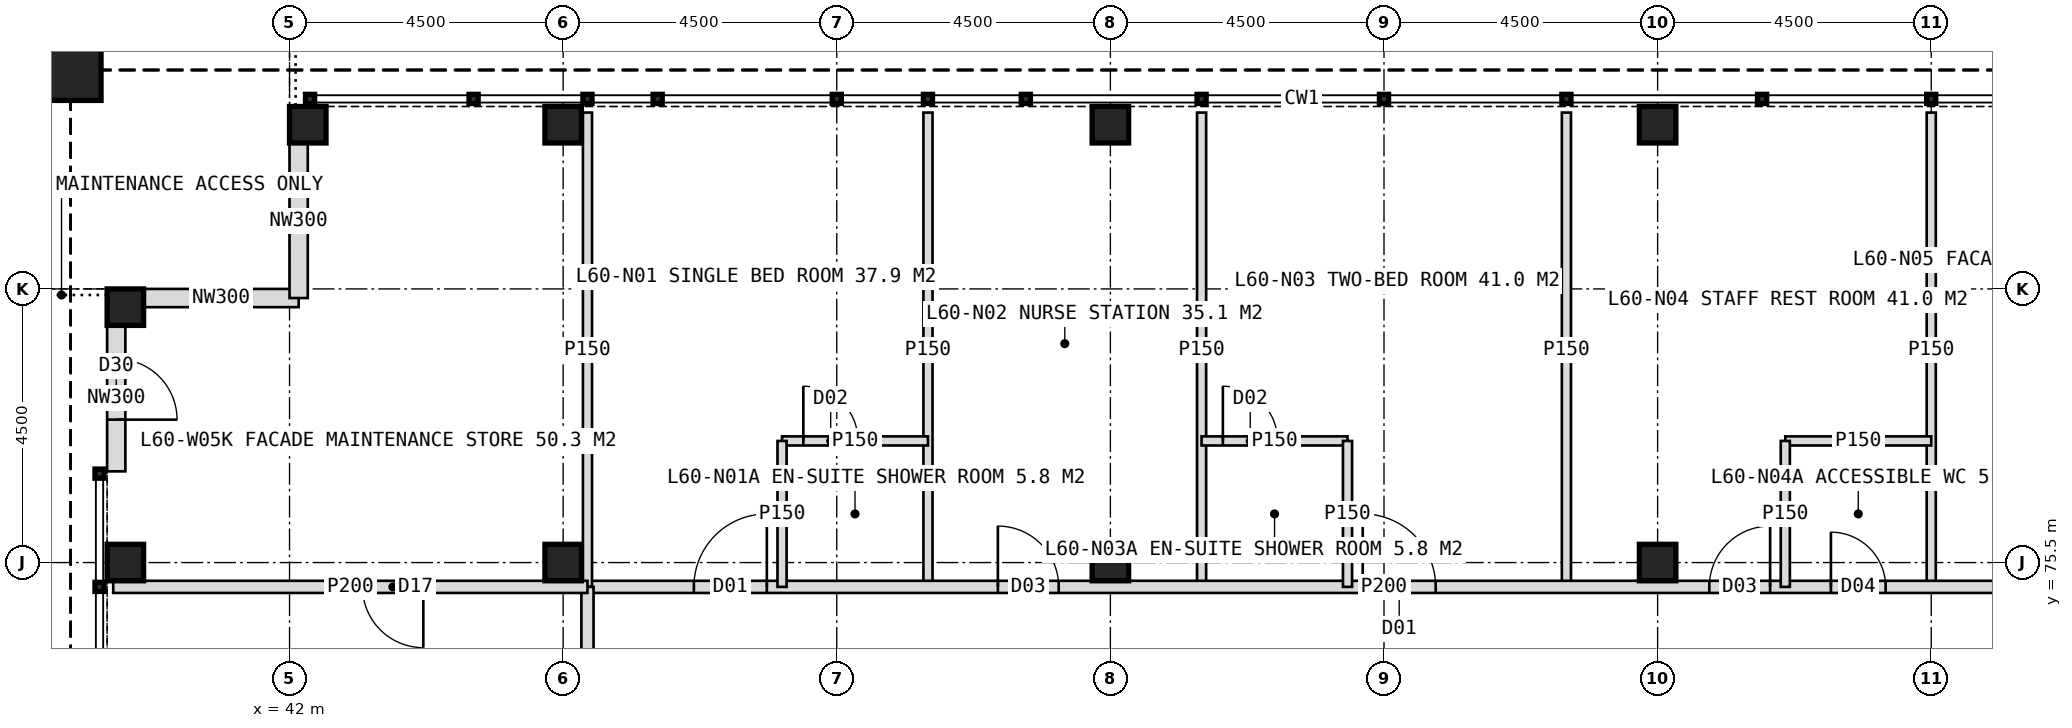
"""IFC4 building model, lengths in metres.
Left out: names, types, materials, properties, quantities, classifications, styles, units other than length and angle.
Written with IfcOpenShell. Run it as: python <this file> out.ifc"""

import sys

from ifc_helpers import new_model, si_unit, direction, frame, frame_2d, origin, origin_2d, place, context, subcontext, project, spatial, rectangle, hollow_rectangle, extrude, element, fill, save


model = new_model("IFC4")
c1 = context("Model", 3, precision=1e-05, world=origin(), true_north=direction((0.0, 1.0)))
c2 = subcontext(c1, "Body", "Model", "MODEL_VIEW")
j1 = project(units=[si_unit("LENGTHUNIT", "METRE"), si_unit("PLANEANGLEUNIT", "RADIAN")], contexts=[c1])
p1 = place(None, origin())
s1 = spatial("IfcSite", under=j1, at=p1, CompositionType="ELEMENT")
p2 = place(p1, origin())
s2 = spatial("IfcBuilding", under=s1, at=p2, CompositionType="ELEMENT")
p3 = place(p2, frame((0.0, 0.0, 250.0)))
s3 = spatial("IfcBuildingStorey", under=s2, at=p3, CompositionType="ELEMENT", Elevation=250.0)
for number, where, z_axis, x_axis in (
    (1, (46.5, 75.5, 0.0), (0.0, 0.0, 1.0), (1.0, 0.0, 0.0)),
    (2, (55.5, 75.5, 0.0), (0.0, 0.0, 1.0), (1.0, 0.0, 0.0)),
    (3, (64.5, 75.5, 0.0), (0.0, 0.0, 1.0), (1.0, 0.0, 0.0)),
    (4, (42.3, 82.7, 0.0), (0.0, 0.0, 1.0), (1.0, 0.0, 0.0)),
    (5, (46.5, 82.7, 0.0), (0.0, 0.0, 1.0), (1.0, 0.0, 0.0)),
    (6, (55.5, 82.7, 0.0), (0.0, 0.0, 1.0), (1.0, 0.0, 0.0)),
    (7, (64.5, 82.7, 0.0), (0.0, 0.0, 1.0), (1.0, 0.0, 0.0)),
    (8, (39.3, 75.5, 0.0), (0.0, 0.0, 1.0), (1.0, 0.0, 0.0)),
    (9, (39.3, 79.7, 0.0), (0.0, 0.0, 1.0), (1.0, 0.0, 0.0)),
):
    element("IfcColumn", number, at=place(p3, frame(where, z_axis=z_axis, x_axis=x_axis)), inside=s3, PredefinedType="COLUMN", context=c2, shape_type="SweptSolid", body=[
        extrude(hollow_rectangle(XDim=0.6, YDim=0.6, WallThickness=0.04, at=origin_2d()), origin(), (0.0, 0.0, 1.0), 4.0),
    ])
p4 = place(p3, frame((38.4, 83.6, 2.0), z_axis=(0.0, 0.0, 1.0), x_axis=(1.0, 0.0, 0.0)))
e10 = element("IfcColumn", 10, at=p4, inside=s3, PredefinedType="COLUMN", context=c2, shape_type="SweptSolid", body=[
    extrude(hollow_rectangle(XDim=1.0, YDim=1.0, WallThickness=0.06, at=origin_2d()), origin(), (0.0, 0.0, 1.0), 2.0),
])
p5 = place(p3, frame((39.15, 77.0, 0.0), z_axis=(0.0, 0.0, 1.0), x_axis=(0.0, 1.0, 0.0)))
e11 = element("IfcWall", 11, at=p5, inside=s3, PredefinedType="ELEMENTEDWALL", context=c2, shape_type="SweptSolid", body=[
    extrude(rectangle(XDim=2.4, YDim=0.3, at=frame_2d((1.2, 0.0))), origin(), (0.0, 0.0, 1.0), 3.226),
])
p6 = place(p5, frame((0.85, 0.0, 0.0)))
e12 = element("IfcOpeningElement", 12, at=p6, cuts=e11, PredefinedType="OPENING", context=c2, shape_type="SweptSolid", body=[
    extrude(rectangle(XDim=1.0, YDim=2.1, at=frame_2d((0.5, 1.05))), frame((0.0, 0.16, 0.0), z_axis=(0.0, -1.0, 0.0), x_axis=(1.0, 0.0, 0.0)), (0.0, 0.0, 1.0), 0.32),
])
for number, where, z_axis, x_axis in (
    (13, (39.6, 79.85, 0.0), (0.0, 0.0, 1.0), (1.0, 0.0, 0.0)),
    (14, (42.15, 79.85, 0.0), (0.0, 0.0, 1.0), (0.0, 1.0, 0.0)),
):
    element("IfcWall", number, at=place(p3, frame(where, z_axis=z_axis, x_axis=x_axis)), inside=s3, PredefinedType="ELEMENTEDWALL", context=c2, shape_type="SweptSolid", body=[
        extrude(rectangle(XDim=2.55, YDim=0.3, at=frame_2d((1.275, 0.0))), origin(), (0.0, 0.0, 1.0), 2.95),
    ])
for number, where, z_axis, x_axis in (
    (15, (52.5, 75.1, 0.0), (0.0, 0.0, 1.0), (0.0, 1.0, 0.0)),
    (16, (57.0, 75.1, 0.0), (0.0, 0.0, 1.0), (0.0, 1.0, 0.0)),
    (17, (63.0, 75.1, 0.0), (0.0, 0.0, 1.0), (0.0, 1.0, 0.0)),
    (18, (69.0, 75.1, 0.0), (0.0, 0.0, 1.0), (0.0, 1.0, 0.0)),
):
    element("IfcWall", number, at=place(p3, frame(where, z_axis=z_axis, x_axis=x_axis)), inside=s3, PredefinedType="PARTITIONING", context=c2, shape_type="SweptSolid", body=[
        extrude(rectangle(XDim=7.8, YDim=0.15, at=frame_2d((3.9, 0.0))), origin(), (0.0, 0.0, 1.0), 3.75),
    ])
p7 = place(p3, frame((46.9, 75.1, 0.0), z_axis=(0.0, 0.0, 1.0), x_axis=(1.0, 0.0, 0.0)))
e19 = element("IfcWall", 19, at=p7, inside=s3, PredefinedType="PARTITIONING", context=c2, shape_type="SweptSolid", body=[
    extrude(rectangle(XDim=26.2, YDim=0.2, at=frame_2d((13.1, 0.0))), origin(), (0.0, 0.0, 1.0), 3.75),
])
p8 = place(p7, frame((1.75, 0.0, 0.0)))
e20 = element("IfcOpeningElement", 20, at=p8, cuts=e19, PredefinedType="OPENING", context=c2, shape_type="SweptSolid", body=[
    extrude(rectangle(XDim=1.2, YDim=2.2, at=frame_2d((0.6, 1.1))), frame((0.0, 0.11, 0.0), z_axis=(0.0, -1.0, 0.0), x_axis=(1.0, 0.0, 0.0)), (0.0, 0.0, 1.0), 0.22),
])
p9 = place(p7, frame((6.75, 0.0, 0.0)))
e21 = element("IfcOpeningElement", 21, at=p9, cuts=e19, PredefinedType="OPENING", context=c2, shape_type="SweptSolid", body=[
    extrude(rectangle(XDim=1.0, YDim=2.1, at=frame_2d((0.5, 1.05))), frame((0.0, 0.11, 0.0), z_axis=(0.0, -1.0, 0.0), x_axis=(1.0, 0.0, 0.0)), (0.0, 0.0, 1.0), 0.22),
])
p10 = place(p7, frame((12.75, 0.0, 0.0)))
e22 = element("IfcOpeningElement", 22, at=p10, cuts=e19, PredefinedType="OPENING", context=c2, shape_type="SweptSolid", body=[
    extrude(rectangle(XDim=1.2, YDim=2.2, at=frame_2d((0.6, 1.1))), frame((0.0, 0.11, 0.0), z_axis=(0.0, -1.0, 0.0), x_axis=(1.0, 0.0, 0.0)), (0.0, 0.0, 1.0), 0.22),
])
p11 = place(p7, frame((20.45, 0.0, 0.0)))
e23 = element("IfcOpeningElement", 23, at=p11, cuts=e19, PredefinedType="OPENING", context=c2, shape_type="SweptSolid", body=[
    extrude(rectangle(XDim=0.9, YDim=2.1, at=frame_2d((0.45, 1.05))), frame((0.0, 0.11, 0.0), z_axis=(0.0, -1.0, 0.0), x_axis=(1.0, 0.0, 0.0)), (0.0, 0.0, 1.0), 0.22),
])
p12 = place(p7, frame((18.45, 0.0, 0.0)))
e24 = element("IfcOpeningElement", 24, at=p12, cuts=e19, PredefinedType="OPENING", context=c2, shape_type="SweptSolid", body=[
    extrude(rectangle(XDim=1.0, YDim=2.1, at=frame_2d((0.5, 1.05))), frame((0.0, 0.11, 0.0), z_axis=(0.0, -1.0, 0.0), x_axis=(1.0, 0.0, 0.0)), (0.0, 0.0, 1.0), 0.22),
])
p13 = place(p7, frame((23.65, 0.0, 0.0)))
e25 = element("IfcOpeningElement", 25, at=p13, cuts=e19, PredefinedType="OPENING", context=c2, shape_type="SweptSolid", body=[
    extrude(rectangle(XDim=1.0, YDim=2.1, at=frame_2d((0.5, 1.05))), frame((0.0, 0.11, 0.0), z_axis=(0.0, -1.0, 0.0), x_axis=(1.0, 0.0, 0.0)), (0.0, 0.0, 1.0), 0.22),
])
p14 = place(p3, frame((46.9, 75.1, 0.0), z_axis=(0.0, 0.0, 1.0), x_axis=(0.0, 1.0, 0.0)))
e26 = element("IfcWall", 26, at=p14, inside=s3, PredefinedType="PARTITIONING", context=c2, shape_type="SweptSolid", body=[
    extrude(rectangle(XDim=7.8, YDim=0.15, at=frame_2d((3.9, 0.0))), origin(), (0.0, 0.0, 1.0), 3.75),
])
p15 = place(p3, frame((50.1, 77.5, 0.0), z_axis=(0.0, 0.0, 1.0), x_axis=(1.0, 0.0, 0.0)))
e27 = element("IfcWall", 27, at=p15, inside=s3, PredefinedType="PARTITIONING", context=c2, shape_type="SweptSolid", body=[
    extrude(rectangle(XDim=2.4, YDim=0.15, at=frame_2d((1.2, 0.0))), origin(), (0.0, 0.0, 1.0), 3.75),
])
p16 = place(p15, frame((0.35, 0.0, 0.0)))
e28 = element("IfcOpeningElement", 28, at=p16, cuts=e27, PredefinedType="OPENING", context=c2, shape_type="SweptSolid", body=[
    extrude(rectangle(XDim=0.9, YDim=2.1, at=frame_2d((0.45, 1.05))), frame((0.0, 0.085, 0.0), z_axis=(0.0, -1.0, 0.0), x_axis=(1.0, 0.0, 0.0)), (0.0, 0.0, 1.0), 0.17),
])
p17 = place(p3, frame((50.1, 75.1, 0.0), z_axis=(0.0, 0.0, 1.0), x_axis=(0.0, 1.0, 0.0)))
e29 = element("IfcWall", 29, at=p17, inside=s3, PredefinedType="PARTITIONING", context=c2, shape_type="SweptSolid", body=[
    extrude(rectangle(XDim=2.4, YDim=0.15, at=frame_2d((1.2, 0.0))), origin(), (0.0, 0.0, 1.0), 3.75),
])
p18 = place(p3, frame((57.0, 77.5, 0.0), z_axis=(0.0, 0.0, 1.0), x_axis=(1.0, 0.0, 0.0)))
e30 = element("IfcWall", 30, at=p18, inside=s3, PredefinedType="PARTITIONING", context=c2, shape_type="SweptSolid", body=[
    extrude(rectangle(XDim=2.4, YDim=0.15, at=frame_2d((1.2, 0.0))), origin(), (0.0, 0.0, 1.0), 3.75),
])
p19 = place(p18, frame((0.35, 0.0, 0.0)))
e31 = element("IfcOpeningElement", 31, at=p19, cuts=e30, PredefinedType="OPENING", context=c2, shape_type="SweptSolid", body=[
    extrude(rectangle(XDim=0.9, YDim=2.1, at=frame_2d((0.45, 1.05))), frame((0.0, 0.085, 0.0), z_axis=(0.0, -1.0, 0.0), x_axis=(1.0, 0.0, 0.0)), (0.0, 0.0, 1.0), 0.17),
])
for number, where, z_axis, x_axis in (
    (32, (59.4, 75.1, 0.0), (0.0, 0.0, 1.0), (0.0, 1.0, 0.0)),
    (33, (66.6, 77.5, 0.0), (0.0, 0.0, 1.0), (1.0, 0.0, 0.0)),
    (34, (66.6, 75.1, 0.0), (0.0, 0.0, 1.0), (0.0, 1.0, 0.0)),
):
    element("IfcWall", number, at=place(p3, frame(where, z_axis=z_axis, x_axis=x_axis)), inside=s3, PredefinedType="PARTITIONING", context=c2, shape_type="SweptSolid", body=[
        extrude(rectangle(XDim=2.4, YDim=0.15, at=frame_2d((1.2, 0.0))), origin(), (0.0, 0.0, 1.0), 3.75),
    ])
p20 = place(p3, frame((46.9, 48.9, 0.0), z_axis=(0.0, 0.0, 1.0), x_axis=(0.0, 1.0, 0.0)))
e35 = element("IfcWall", 35, at=p20, inside=s3, PredefinedType="PARTITIONING", context=c2, shape_type="SweptSolid", body=[
    extrude(rectangle(XDim=26.2, YDim=0.2, at=frame_2d((13.1, 0.0))), origin(), (0.0, 0.0, 1.0), 3.75),
])
p21 = place(p20, frame((1.75, 0.0, 0.0)))
e36 = element("IfcOpeningElement", 36, at=p21, cuts=e35, PredefinedType="OPENING", context=c2, shape_type="SweptSolid", body=[
    extrude(rectangle(XDim=1.2, YDim=2.2, at=frame_2d((0.6, 1.1))), frame((0.0, 0.11, 0.0), z_axis=(0.0, -1.0, 0.0), x_axis=(1.0, 0.0, 0.0)), (0.0, 0.0, 1.0), 0.22),
])
p22 = place(p20, frame((6.75, 0.0, 0.0)))
e37 = element("IfcOpeningElement", 37, at=p22, cuts=e35, PredefinedType="OPENING", context=c2, shape_type="SweptSolid", body=[
    extrude(rectangle(XDim=1.0, YDim=2.1, at=frame_2d((0.5, 1.05))), frame((0.0, 0.11, 0.0), z_axis=(0.0, -1.0, 0.0), x_axis=(1.0, 0.0, 0.0)), (0.0, 0.0, 1.0), 0.22),
])
p23 = place(p20, frame((11.1, 0.0, 0.0)))
e38 = element("IfcOpeningElement", 38, at=p23, cuts=e35, PredefinedType="OPENING", context=c2, shape_type="SweptSolid", body=[
    extrude(rectangle(XDim=1.0, YDim=2.1, at=frame_2d((0.5, 1.05))), frame((0.0, 0.11, 0.0), z_axis=(0.0, -1.0, 0.0), x_axis=(1.0, 0.0, 0.0)), (0.0, 0.0, 1.0), 0.22),
])
p24 = place(p20, frame((18.45, 0.0, 0.0)))
e39 = element("IfcOpeningElement", 39, at=p24, cuts=e35, PredefinedType="OPENING", context=c2, shape_type="SweptSolid", body=[
    extrude(rectangle(XDim=1.2, YDim=2.2, at=frame_2d((0.6, 1.1))), frame((0.0, 0.11, 0.0), z_axis=(0.0, -1.0, 0.0), x_axis=(1.0, 0.0, 0.0)), (0.0, 0.0, 1.0), 0.22),
])
p25 = place(p20, frame((22.9, 0.0, 0.0)))
e40 = element("IfcOpeningElement", 40, at=p25, cuts=e35, PredefinedType="OPENING", context=c2, shape_type="SweptSolid", body=[
    extrude(rectangle(XDim=1.0, YDim=2.1, at=frame_2d((0.5, 1.05))), frame((0.0, 0.11, 0.0), z_axis=(0.0, -1.0, 0.0), x_axis=(1.0, 0.0, 0.0)), (0.0, 0.0, 1.0), 0.22),
])
p26 = place(p3, frame((46.9, 75.1, 0.0), z_axis=(0.0, 0.0, 1.0), x_axis=(-1.0, 0.0, 0.0)))
e41 = element("IfcWall", 41, at=p26, inside=s3, PredefinedType="PARTITIONING", context=c2, shape_type="SweptSolid", body=[
    extrude(rectangle(XDim=7.8, YDim=0.2, at=frame_2d((3.9, 0.0))), origin(), (0.0, 0.0, 1.0), 3.75),
])
p27 = place(p26, frame((2.7, 0.0, 0.0)))
e42 = element("IfcOpeningElement", 42, at=p27, cuts=e41, PredefinedType="OPENING", context=c2, shape_type="SweptSolid", body=[
    extrude(rectangle(XDim=1.0, YDim=2.1, at=frame_2d((0.5, 1.05))), frame((0.0, 0.11, 0.0), z_axis=(0.0, -1.0, 0.0), x_axis=(1.0, 0.0, 0.0)), (0.0, 0.0, 1.0), 0.22),
])
p28 = place(p8, origin())
e43 = element("IfcDoor", 43, at=p28, inside=s3, OperationType="SINGLE_SWING_RIGHT", PredefinedType="DOOR", context=c2, shape_type="SweptSolid", body=[
    extrude(rectangle(XDim=1.2, YDim=2.2, at=frame_2d((0.6, 1.1))), frame((0.0, 0.025, 0.0), z_axis=(0.0, -1.0, 0.0), x_axis=(1.0, 0.0, 0.0)), (0.0, 0.0, 1.0), 0.05),
])
fill(e20, e43)
p29 = place(p16, origin())
e44 = element("IfcDoor", 44, at=p29, inside=s3, OperationType="SINGLE_SWING_LEFT", PredefinedType="DOOR", context=c2, shape_type="SweptSolid", body=[
    extrude(rectangle(XDim=0.9, YDim=2.1, at=frame_2d((0.45, 1.05))), frame((0.0, 0.025, 0.0), z_axis=(0.0, -1.0, 0.0), x_axis=(1.0, 0.0, 0.0)), (0.0, 0.0, 1.0), 0.05),
])
fill(e28, e44)
p30 = place(p9, origin())
e45 = element("IfcDoor", 45, at=p30, inside=s3, OperationType="SINGLE_SWING_LEFT", PredefinedType="DOOR", context=c2, shape_type="SweptSolid", body=[
    extrude(rectangle(XDim=1.0, YDim=2.1, at=frame_2d((0.5, 1.05))), frame((0.0, 0.025, 0.0), z_axis=(0.0, -1.0, 0.0), x_axis=(1.0, 0.0, 0.0)), (0.0, 0.0, 1.0), 0.05),
])
fill(e21, e45)
p31 = place(p10, origin())
e46 = element("IfcDoor", 46, at=p31, inside=s3, OperationType="SINGLE_SWING_LEFT", PredefinedType="DOOR", context=c2, shape_type="SweptSolid", body=[
    extrude(rectangle(XDim=1.2, YDim=2.2, at=frame_2d((0.6, 1.1))), frame((0.0, 0.025, 0.0), z_axis=(0.0, -1.0, 0.0), x_axis=(1.0, 0.0, 0.0)), (0.0, 0.0, 1.0), 0.05),
])
fill(e22, e46)
p32 = place(p19, origin())
e47 = element("IfcDoor", 47, at=p32, inside=s3, OperationType="SINGLE_SWING_LEFT", PredefinedType="DOOR", context=c2, shape_type="SweptSolid", body=[
    extrude(rectangle(XDim=0.9, YDim=2.1, at=frame_2d((0.45, 1.05))), frame((0.0, 0.025, 0.0), z_axis=(0.0, -1.0, 0.0), x_axis=(1.0, 0.0, 0.0)), (0.0, 0.0, 1.0), 0.05),
])
fill(e31, e47)
p33 = place(p11, origin())
e48 = element("IfcDoor", 48, at=p33, inside=s3, OperationType="SINGLE_SWING_LEFT", PredefinedType="DOOR", context=c2, shape_type="SweptSolid", body=[
    extrude(rectangle(XDim=0.9, YDim=2.1, at=frame_2d((0.45, 1.05))), frame((0.0, 0.025, 0.0), z_axis=(0.0, -1.0, 0.0), x_axis=(1.0, 0.0, 0.0)), (0.0, 0.0, 1.0), 0.05),
])
fill(e23, e48)
p34 = place(p12, origin())
e49 = element("IfcDoor", 49, at=p34, inside=s3, OperationType="SINGLE_SWING_RIGHT", PredefinedType="DOOR", context=c2, shape_type="SweptSolid", body=[
    extrude(rectangle(XDim=1.0, YDim=2.1, at=frame_2d((0.5, 1.05))), frame((0.0, 0.025, 0.0), z_axis=(0.0, -1.0, 0.0), x_axis=(1.0, 0.0, 0.0)), (0.0, 0.0, 1.0), 0.05),
])
fill(e24, e49)
p35 = place(p27, origin())
e50 = element("IfcDoor", 50, at=p35, inside=s3, OperationType="SINGLE_SWING_LEFT", PredefinedType="DOOR", context=c2, shape_type="SweptSolid", body=[
    extrude(rectangle(XDim=1.0, YDim=2.1, at=frame_2d((0.5, 1.05))), frame((0.0, 0.025, 0.0), z_axis=(0.0, -1.0, 0.0), x_axis=(1.0, 0.0, 0.0)), (0.0, 0.0, 1.0), 0.05),
])
fill(e42, e50)
p36 = place(p6, frame((1.0, 0.0, 0.0), z_axis=(0.0, 0.0, 1.0), x_axis=(-1.0, 0.0, 0.0)))
e51 = element("IfcDoor", 51, at=p36, inside=s3, OperationType="SINGLE_SWING_RIGHT", PredefinedType="DOOR", context=c2, shape_type="SweptSolid", body=[
    extrude(rectangle(XDim=1.0, YDim=2.1, at=frame_2d((0.5, 1.05))), frame((0.0, 0.025, 0.0), z_axis=(0.0, -1.0, 0.0), x_axis=(1.0, 0.0, 0.0)), (0.0, 0.0, 1.0), 0.05),
])
fill(e12, e51)
save(model, sys.argv[1])
